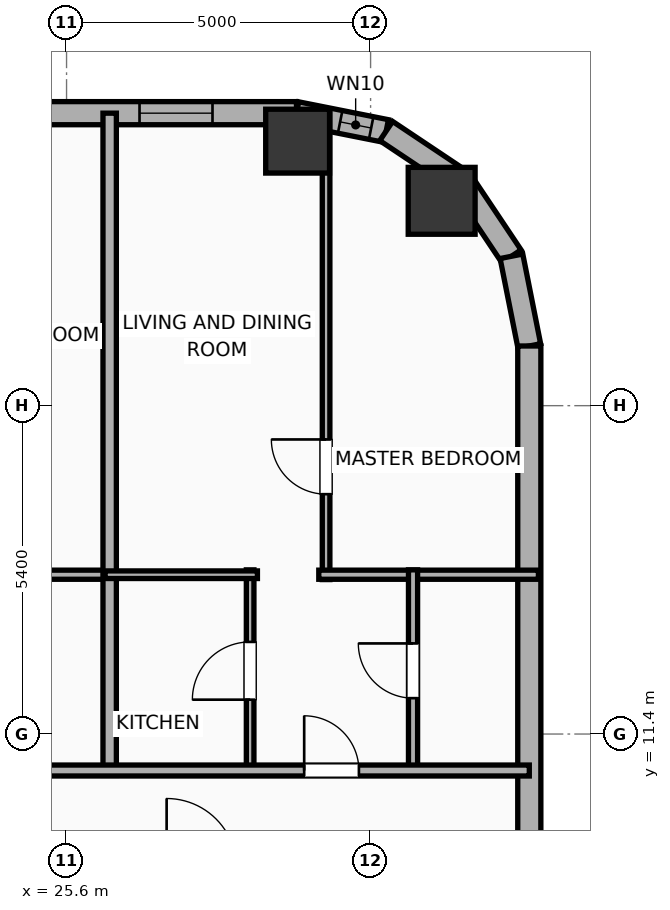
"""IFC4 building model, lengths in metres.
Left out: names, types, materials, properties, quantities, classifications, styles, units other than length and angle.
Written with IfcOpenShell. Run it as: python <this file> out.ifc"""

import sys

from ifc_helpers import new_model, si_unit, direction, frame, frame_2d, origin, origin_2d, place, context, subcontext, project, spatial, rectangle, hollow_rectangle, hollow_circle, extrude, element, fill, save


model = new_model("IFC4")
c1 = context("Model", 3, precision=1e-05, world=origin(), true_north=direction((0.0, 1.0)))
c2 = subcontext(c1, "Body", "Model", "MODEL_VIEW")
j1 = project(units=[si_unit("LENGTHUNIT", "METRE"), si_unit("PLANEANGLEUNIT", "RADIAN")], contexts=[c1])
p1 = place(None, origin())
s1 = spatial("IfcSite", under=j1, at=p1, CompositionType="ELEMENT")
p2 = place(p1, origin())
s2 = spatial("IfcBuilding", under=s1, at=p2, CompositionType="ELEMENT")
p3 = place(p2, frame((0.0, 0.0, 132.6)))
s3 = spatial("IfcBuildingStorey", under=s2, at=p3, CompositionType="ELEMENT", Elevation=132.6)
p4 = place(p3, frame((31.769, 20.169, 0.0), z_axis=(0.0, 0.0, 1.0), x_axis=(1.0, 0.0, 0.0)))
e1 = element("IfcColumn", 1, at=p4, inside=s3, PredefinedType="COLUMN", context=c2, shape_type="SweptSolid", body=[
    extrude(hollow_circle(Radius=0.55, WallThickness=0.036, at=origin_2d()), origin(), (0.0, 0.0, 1.0), 3.9),
])
p5 = place(p3, frame((29.4, 21.15, 0.0), z_axis=(0.0, 0.0, 1.0), x_axis=(1.0, 0.0, 0.0)))
e2 = element("IfcColumn", 2, at=p5, inside=s3, PredefinedType="COLUMN", context=c2, shape_type="SweptSolid", body=[
    extrude(hollow_rectangle(XDim=1.05, YDim=1.05, WallThickness=0.036, at=origin_2d()), origin(), (0.0, 0.0, 1.0), 3.9),
])
p6 = place(p3, frame((-25.381, 21.61, 0.0), z_axis=(0.0, 0.0, 1.0), x_axis=(1.0, 0.0, 0.0)))
e3 = element("IfcWall", 3, at=p6, inside=s3, PredefinedType="ELEMENTEDWALL", context=c2, shape_type="SweptSolid", body=[
    extrude(rectangle(XDim=54.763, YDim=0.38, at=frame_2d((27.381, 0.0))), origin(), (0.0, 0.0, 1.0), 3.65),
])
p7 = place(p6, frame((5.645, 0.0, 0.75)))
e4 = element("IfcOpeningElement", 4, at=p7, cuts=e3, PredefinedType="OPENING", context=c2, shape_type="SweptSolid", body=[
    extrude(rectangle(XDim=2.4, YDim=2.1, at=frame_2d((1.2, 1.05))), frame((0.0, 0.2, 0.0), z_axis=(0.0, -1.0, 0.0), x_axis=(1.0, 0.0, 0.0)), (0.0, 0.0, 1.0), 0.4),
])
p8 = place(p6, frame((45.067, 0.0, 0.75)))
e5 = element("IfcOpeningElement", 5, at=p8, cuts=e3, PredefinedType="OPENING", context=c2, shape_type="SweptSolid", body=[
    extrude(rectangle(XDim=2.4, YDim=2.1, at=frame_2d((1.2, 1.05))), frame((0.0, 0.2, 0.0), z_axis=(0.0, -1.0, 0.0), x_axis=(1.0, 0.0, 0.0)), (0.0, 0.0, 1.0), 0.4),
])
p9 = place(p6, frame((1.831, 0.0, 0.75)))
e6 = element("IfcOpeningElement", 6, at=p9, cuts=e3, PredefinedType="OPENING", context=c2, shape_type="SweptSolid", body=[
    extrude(rectangle(XDim=1.2, YDim=2.05, at=frame_2d((0.6, 1.025))), frame((0.0, 0.2, 0.0), z_axis=(0.0, -1.0, 0.0), x_axis=(1.0, 0.0, 0.0)), (0.0, 0.0, 1.0), 0.4),
])
p10 = place(p6, frame((8.996, 0.0, 0.75)))
e7 = element("IfcOpeningElement", 7, at=p10, cuts=e3, PredefinedType="OPENING", context=c2, shape_type="SweptSolid", body=[
    extrude(rectangle(XDim=1.2, YDim=2.05, at=frame_2d((0.6, 1.025))), frame((0.0, 0.2, 0.0), z_axis=(0.0, -1.0, 0.0), x_axis=(1.0, 0.0, 0.0)), (0.0, 0.0, 1.0), 0.4),
])
p11 = place(p6, frame((15.102, 0.0, 0.75)))
e8 = element("IfcOpeningElement", 8, at=p11, cuts=e3, PredefinedType="OPENING", context=c2, shape_type="SweptSolid", body=[
    extrude(rectangle(XDim=1.2, YDim=2.05, at=frame_2d((0.6, 1.025))), frame((0.0, 0.2, 0.0), z_axis=(0.0, -1.0, 0.0), x_axis=(1.0, 0.0, 0.0)), (0.0, 0.0, 1.0), 0.4),
])
p12 = place(p6, frame((12.352, 0.0, 0.75)))
e9 = element("IfcOpeningElement", 9, at=p12, cuts=e3, PredefinedType="OPENING", context=c2, shape_type="SweptSolid", body=[
    extrude(rectangle(XDim=1.2, YDim=2.05, at=frame_2d((0.6, 1.025))), frame((0.0, 0.2, 0.0), z_axis=(0.0, -1.0, 0.0), x_axis=(1.0, 0.0, 0.0)), (0.0, 0.0, 1.0), 0.4),
])
p13 = place(p6, frame((19.936, 0.0, 0.75)))
e10 = element("IfcOpeningElement", 10, at=p13, cuts=e3, PredefinedType="OPENING", context=c2, shape_type="SweptSolid", body=[
    extrude(rectangle(XDim=1.2, YDim=2.05, at=frame_2d((0.6, 1.025))), frame((0.0, 0.2, 0.0), z_axis=(0.0, -1.0, 0.0), x_axis=(1.0, 0.0, 0.0)), (0.0, 0.0, 1.0), 0.4),
])
p14 = place(p6, frame((17.786, 0.0, 0.75)))
e11 = element("IfcOpeningElement", 11, at=p14, cuts=e3, PredefinedType="OPENING", context=c2, shape_type="SweptSolid", body=[
    extrude(rectangle(XDim=1.2, YDim=2.05, at=frame_2d((0.6, 1.025))), frame((0.0, 0.2, 0.0), z_axis=(0.0, -1.0, 0.0), x_axis=(1.0, 0.0, 0.0)), (0.0, 0.0, 1.0), 0.4),
])
p15 = place(p6, frame((23.826, 0.0, 0.75)))
e12 = element("IfcOpeningElement", 12, at=p15, cuts=e3, PredefinedType="OPENING", context=c2, shape_type="SweptSolid", body=[
    extrude(rectangle(XDim=1.2, YDim=2.05, at=frame_2d((0.6, 1.025))), frame((0.0, 0.2, 0.0), z_axis=(0.0, -1.0, 0.0), x_axis=(1.0, 0.0, 0.0)), (0.0, 0.0, 1.0), 0.4),
])
p16 = place(p6, frame((26.576, 0.0, 0.75)))
e13 = element("IfcOpeningElement", 13, at=p16, cuts=e3, PredefinedType="OPENING", context=c2, shape_type="SweptSolid", body=[
    extrude(rectangle(XDim=1.2, YDim=2.05, at=frame_2d((0.6, 1.025))), frame((0.0, 0.2, 0.0), z_axis=(0.0, -1.0, 0.0), x_axis=(1.0, 0.0, 0.0)), (0.0, 0.0, 1.0), 0.4),
])
p17 = place(p6, frame((30.431, 0.0, 0.75)))
e14 = element("IfcOpeningElement", 14, at=p17, cuts=e3, PredefinedType="OPENING", context=c2, shape_type="SweptSolid", body=[
    extrude(rectangle(XDim=1.2, YDim=2.05, at=frame_2d((0.6, 1.025))), frame((0.0, 0.2, 0.0), z_axis=(0.0, -1.0, 0.0), x_axis=(1.0, 0.0, 0.0)), (0.0, 0.0, 1.0), 0.4),
])
p18 = place(p6, frame((38.581, 0.0, 0.75)))
e15 = element("IfcOpeningElement", 15, at=p18, cuts=e3, PredefinedType="OPENING", context=c2, shape_type="SweptSolid", body=[
    extrude(rectangle(XDim=1.2, YDim=2.05, at=frame_2d((0.6, 1.025))), frame((0.0, 0.2, 0.0), z_axis=(0.0, -1.0, 0.0), x_axis=(1.0, 0.0, 0.0)), (0.0, 0.0, 1.0), 0.4),
])
p19 = place(p6, frame((34.786, 0.0, 0.75)))
e16 = element("IfcOpeningElement", 16, at=p19, cuts=e3, PredefinedType="OPENING", context=c2, shape_type="SweptSolid", body=[
    extrude(rectangle(XDim=1.2, YDim=2.05, at=frame_2d((0.6, 1.025))), frame((0.0, 0.2, 0.0), z_axis=(0.0, -1.0, 0.0), x_axis=(1.0, 0.0, 0.0)), (0.0, 0.0, 1.0), 0.4),
])
p20 = place(p6, frame((41.876, 0.0, 0.75)))
e17 = element("IfcOpeningElement", 17, at=p20, cuts=e3, PredefinedType="OPENING", context=c2, shape_type="SweptSolid", body=[
    extrude(rectangle(XDim=1.2, YDim=2.05, at=frame_2d((0.6, 1.025))), frame((0.0, 0.2, 0.0), z_axis=(0.0, -1.0, 0.0), x_axis=(1.0, 0.0, 0.0)), (0.0, 0.0, 1.0), 0.4),
])
p21 = place(p6, frame((49.385, 0.0, 0.75)))
e18 = element("IfcOpeningElement", 18, at=p21, cuts=e3, PredefinedType="OPENING", context=c2, shape_type="SweptSolid", body=[
    extrude(rectangle(XDim=1.2, YDim=2.05, at=frame_2d((0.6, 1.025))), frame((0.0, 0.2, 0.0), z_axis=(0.0, -1.0, 0.0), x_axis=(1.0, 0.0, 0.0)), (0.0, 0.0, 1.0), 0.4),
])
p22 = place(p6, frame((52.181, 0.0, 0.75)))
e19 = element("IfcOpeningElement", 19, at=p22, cuts=e3, PredefinedType="OPENING", context=c2, shape_type="SweptSolid", body=[
    extrude(rectangle(XDim=1.2, YDim=2.05, at=frame_2d((0.6, 1.025))), frame((0.0, 0.2, 0.0), z_axis=(0.0, -1.0, 0.0), x_axis=(1.0, 0.0, 0.0)), (0.0, 0.0, 1.0), 0.4),
])
p23 = place(p3, frame((29.381, 21.61, 0.0), z_axis=(0.0, 0.0, 1.0), x_axis=(0.980755066645, -0.195242155415, 0.0)))
e20 = element("IfcWall", 20, at=p23, inside=s3, PredefinedType="ELEMENTEDWALL", context=c2, shape_type="SweptSolid", body=[
    extrude(rectangle(XDim=1.504, YDim=0.38, at=frame_2d((0.752, 0.0))), origin(), (0.0, 0.0, 1.0), 3.65),
])
p24 = place(p23, frame((0.732, 0.0, 0.75)))
e21 = element("IfcOpeningElement", 21, at=p24, cuts=e20, PredefinedType="OPENING", context=c2, shape_type="SweptSolid", body=[
    extrude(rectangle(XDim=0.52, YDim=2.05, at=frame_2d((0.26, 1.025))), frame((0.0, 0.2, 0.0), z_axis=(0.0, -1.0, 0.0), x_axis=(1.0, 0.0, 0.0)), (0.0, 0.0, 1.0), 0.4),
])
p25 = place(p3, frame((30.857, 21.316, 0.0), z_axis=(0.0, 0.0, 1.0), x_axis=(0.831468045563, -0.555572577804, 0.0)))
e22 = element("IfcWall", 22, at=p25, inside=s3, PredefinedType="ELEMENTEDWALL", context=c2, shape_type="SweptSolid", body=[
    extrude(rectangle(XDim=1.485, YDim=0.38, at=frame_2d((0.742, 0.0))), origin(), (0.0, 0.0, 1.0), 3.65),
])
p26 = place(p3, frame((32.091, 20.491, 0.0), z_axis=(0.0, 0.0, 1.0), x_axis=(0.555610286119, -0.831442848281, 0.0)))
e23 = element("IfcWall", 23, at=p26, inside=s3, PredefinedType="ELEMENTEDWALL", context=c2, shape_type="SweptSolid", body=[
    extrude(rectangle(XDim=1.485, YDim=0.38, at=frame_2d((0.743, 0.0))), origin(), (0.0, 0.0, 1.0), 3.65),
])
p27 = place(p3, frame((32.917, 19.257, 0.0), z_axis=(0.0, 0.0, 1.0), x_axis=(0.195086038585, -0.980786132421, 0.0)))
e24 = element("IfcWall", 24, at=p27, inside=s3, PredefinedType="ELEMENTEDWALL", context=c2, shape_type="SweptSolid", body=[
    extrude(rectangle(XDim=1.504, YDim=0.38, at=frame_2d((0.752, 0.0))), origin(), (0.0, 0.0, 1.0), 3.65),
])
p28 = place(p3, frame((33.21, 17.781, 0.0), z_axis=(0.0, 0.0, 1.0), x_axis=(0.0, -1.0, 0.0)))
e25 = element("IfcWall", 25, at=p28, inside=s3, PredefinedType="ELEMENTEDWALL", context=c2, shape_type="SweptSolid", body=[
    extrude(rectangle(XDim=34.363, YDim=0.38, at=frame_2d((17.181, 0.0))), origin(), (0.0, 0.0, 1.0), 3.65),
])
p29 = place(p28, frame((32.008, 0.0, 0.75)))
e26 = element("IfcOpeningElement", 26, at=p29, cuts=e25, PredefinedType="OPENING", context=c2, shape_type="SweptSolid", body=[
    extrude(rectangle(XDim=1.2, YDim=2.05, at=frame_2d((0.6, 1.025))), frame((0.0, 0.2, 0.0), z_axis=(0.0, -1.0, 0.0), x_axis=(1.0, 0.0, 0.0)), (0.0, 0.0, 1.0), 0.4),
])
p30 = place(p28, frame((12.486, 0.0, 0.75)))
e27 = element("IfcOpeningElement", 27, at=p30, cuts=e25, PredefinedType="OPENING", context=c2, shape_type="SweptSolid", body=[
    extrude(rectangle(XDim=1.2, YDim=2.05, at=frame_2d((0.6, 1.025))), frame((0.0, 0.2, 0.0), z_axis=(0.0, -1.0, 0.0), x_axis=(1.0, 0.0, 0.0)), (0.0, 0.0, 1.0), 0.4),
])
p31 = place(p28, frame((21.736, 0.0, 0.75)))
e28 = element("IfcOpeningElement", 28, at=p31, cuts=e25, PredefinedType="OPENING", context=c2, shape_type="SweptSolid", body=[
    extrude(rectangle(XDim=1.2, YDim=2.05, at=frame_2d((0.6, 1.025))), frame((0.0, 0.2, 0.0), z_axis=(0.0, -1.0, 0.0), x_axis=(1.0, 0.0, 0.0)), (0.0, 0.0, 1.0), 0.4),
])
p32 = place(p3, frame((22.779, 14.02, 0.0), z_axis=(0.0, 0.0, 1.0), x_axis=(1.0, 0.0, 0.0)))
e29 = element("IfcWall", 29, at=p32, inside=s3, PredefinedType="PLUMBINGWALL", context=c2, shape_type="SweptSolid", body=[
    extrude(rectangle(XDim=3.605, YDim=0.15, at=frame_2d((1.802, 0.0))), origin(), (0.0, 0.0, 1.0), 3.65),
])
p33 = place(p3, frame((26.309, 10.72, 0.0), z_axis=(0.0, 0.0, 1.0), x_axis=(0.0, 1.0, 0.0)))
e30 = element("IfcWall", 30, at=p33, inside=s3, PredefinedType="PARTITIONING", context=c2, shape_type="SweptSolid", body=[
    extrude(rectangle(XDim=10.89, YDim=0.22, at=frame_2d((5.445, 0.0))), origin(), (0.0, 0.0, 1.0), 3.65),
])
p34 = place(p3, frame((29.868, 13.94, 0.0), z_axis=(0.0, 0.0, 1.0), x_axis=(0.0, 1.0, 0.0)))
e31 = element("IfcWall", 31, at=p34, inside=s3, PredefinedType="PARTITIONING", context=c2, shape_type="SweptSolid", body=[
    extrude(rectangle(XDim=7.726, YDim=0.125, at=frame_2d((3.863, 0.0))), origin(), (0.0, 0.0, 1.0), 3.65),
])
p35 = place(p34, frame((1.404, 0.0, 0.0)))
e32 = element("IfcOpeningElement", 32, at=p35, cuts=e31, PredefinedType="OPENING", context=c2, shape_type="SweptSolid", body=[
    extrude(rectangle(XDim=0.9, YDim=2.05, at=frame_2d((0.45, 1.025))), frame((0.0, 0.073, 0.0), z_axis=(0.0, -1.0, 0.0), x_axis=(1.0, 0.0, 0.0)), (0.0, 0.0, 1.0), 0.145),
])
p36 = place(p3, frame((29.748, 14.02, 0.0), z_axis=(0.0, 0.0, 1.0), x_axis=(1.0, 0.0, 0.0)))
e33 = element("IfcWall", 33, at=p36, inside=s3, PredefinedType="PLUMBINGWALL", context=c2, shape_type="SweptSolid", body=[
    extrude(rectangle(XDim=3.612, YDim=0.15, at=frame_2d((1.806, 0.0))), origin(), (0.0, 0.0, 1.0), 3.65),
])
p37 = place(p3, frame((28.619, 10.78, 0.0), z_axis=(0.0, 0.0, 1.0), x_axis=(0.0, 1.0, 0.0)))
e34 = element("IfcWall", 34, at=p37, inside=s3, PredefinedType="PARTITIONING", context=c2, shape_type="SweptSolid", body=[
    extrude(rectangle(XDim=3.32, YDim=0.125, at=frame_2d((1.66, 0.0))), origin(), (0.0, 0.0, 1.0), 3.65),
])
p38 = place(p37, frame((1.185, 0.0, 0.0)))
e35 = element("IfcOpeningElement", 35, at=p38, cuts=e34, PredefinedType="OPENING", context=c2, shape_type="SweptSolid", body=[
    extrude(rectangle(XDim=0.95, YDim=2.05, at=frame_2d((0.475, 1.025))), frame((0.0, 0.073, 0.0), z_axis=(0.0, -1.0, 0.0), x_axis=(1.0, 0.0, 0.0)), (0.0, 0.0, 1.0), 0.145),
])
p39 = place(p3, frame((26.234, 14.02, 0.0), z_axis=(0.0, 0.0, 1.0), x_axis=(1.0, 0.0, 0.0)))
e36 = element("IfcWall", 36, at=p39, inside=s3, PredefinedType="PARTITIONING", context=c2, shape_type="SweptSolid", body=[
    extrude(rectangle(XDim=2.505, YDim=0.125, at=frame_2d((1.252, 0.0))), origin(), (0.0, 0.0, 1.0), 3.65),
])
p40 = place(p3, frame((31.298, 10.78, 0.0), z_axis=(0.0, 0.0, 1.0), x_axis=(0.0, 1.0, 0.0)))
e37 = element("IfcWall", 37, at=p40, inside=s3, PredefinedType="PLUMBINGWALL", context=c2, shape_type="SweptSolid", body=[
    extrude(rectangle(XDim=3.32, YDim=0.15, at=frame_2d((1.66, 0.0))), origin(), (0.0, 0.0, 1.0), 3.65),
])
p41 = place(p40, frame((1.21, 0.0, 0.0)))
e38 = element("IfcOpeningElement", 38, at=p41, cuts=e37, PredefinedType="OPENING", context=c2, shape_type="SweptSolid", body=[
    extrude(rectangle(XDim=0.9, YDim=2.05, at=frame_2d((0.45, 1.025))), frame((0.0, 0.085, 0.0), z_axis=(0.0, -1.0, 0.0), x_axis=(1.0, 0.0, 0.0)), (0.0, 0.0, 1.0), 0.17),
])
p42 = place(p3, frame((-29.21, 10.8, 0.0), z_axis=(0.0, 0.0, 1.0), x_axis=(1.0, 0.0, 0.0)))
e39 = element("IfcWall", 39, at=p42, inside=s3, PredefinedType="PARTITIONING", context=c2, shape_type="SweptSolid", body=[
    extrude(rectangle(XDim=62.42, YDim=0.18, at=frame_2d((31.21, 0.0))), origin(), (0.0, 0.0, 1.0), 3.65),
])
p43 = place(p42, frame((3.457, 0.0, 0.0)))
e40 = element("IfcOpeningElement", 40, at=p43, cuts=e39, PredefinedType="OPENING", context=c2, shape_type="SweptSolid", body=[
    extrude(rectangle(XDim=1.15, YDim=2.05, at=frame_2d((0.575, 1.025))), frame((0.0, 0.1, 0.0), z_axis=(0.0, -1.0, 0.0), x_axis=(1.0, 0.0, 0.0)), (0.0, 0.0, 1.0), 0.2),
])
p44 = place(p42, frame((11.297, 0.0, 0.0)))
e41 = element("IfcOpeningElement", 41, at=p44, cuts=e39, PredefinedType="OPENING", context=c2, shape_type="SweptSolid", body=[
    extrude(rectangle(XDim=1.15, YDim=2.05, at=frame_2d((0.575, 1.025))), frame((0.0, 0.1, 0.0), z_axis=(0.0, -1.0, 0.0), x_axis=(1.0, 0.0, 0.0)), (0.0, 0.0, 1.0), 0.2),
])
p45 = place(p42, frame((18.925, 0.0, 0.0)))
e42 = element("IfcOpeningElement", 42, at=p45, cuts=e39, PredefinedType="OPENING", context=c2, shape_type="SweptSolid", body=[
    extrude(rectangle(XDim=1.15, YDim=2.05, at=frame_2d((0.575, 1.025))), frame((0.0, 0.1, 0.0), z_axis=(0.0, -1.0, 0.0), x_axis=(1.0, 0.0, 0.0)), (0.0, 0.0, 1.0), 0.2),
])
p46 = place(p42, frame((24.362, 0.0, 0.0)))
e43 = element("IfcOpeningElement", 43, at=p46, cuts=e39, PredefinedType="OPENING", context=c2, shape_type="SweptSolid", body=[
    extrude(rectangle(XDim=1.15, YDim=2.05, at=frame_2d((0.575, 1.025))), frame((0.0, 0.1, 0.0), z_axis=(0.0, -1.0, 0.0), x_axis=(1.0, 0.0, 0.0)), (0.0, 0.0, 1.0), 0.2),
])
p47 = place(p42, frame((27.708, 0.0, 0.0)))
e44 = element("IfcOpeningElement", 44, at=p47, cuts=e39, PredefinedType="OPENING", context=c2, shape_type="SweptSolid", body=[
    extrude(rectangle(XDim=1.15, YDim=2.05, at=frame_2d((0.575, 1.025))), frame((0.0, 0.1, 0.0), z_axis=(0.0, -1.0, 0.0), x_axis=(1.0, 0.0, 0.0)), (0.0, 0.0, 1.0), 0.2),
])
p48 = place(p42, frame((34.618, 0.0, 0.0)))
e45 = element("IfcOpeningElement", 45, at=p48, cuts=e39, PredefinedType="OPENING", context=c2, shape_type="SweptSolid", body=[
    extrude(rectangle(XDim=0.9, YDim=2.05, at=frame_2d((0.45, 1.025))), frame((0.0, 0.1, 0.0), z_axis=(0.0, -1.0, 0.0), x_axis=(1.0, 0.0, 0.0)), (0.0, 0.0, 1.0), 0.2),
])
p49 = place(p42, frame((43.106, 0.0, 0.0)))
e46 = element("IfcOpeningElement", 46, at=p49, cuts=e39, PredefinedType="OPENING", context=c2, shape_type="SweptSolid", body=[
    extrude(rectangle(XDim=1.15, YDim=2.05, at=frame_2d((0.575, 1.025))), frame((0.0, 0.1, 0.0), z_axis=(0.0, -1.0, 0.0), x_axis=(1.0, 0.0, 0.0)), (0.0, 0.0, 1.0), 0.2),
])
p50 = place(p42, frame((51.777, 0.0, 0.0)))
e47 = element("IfcOpeningElement", 47, at=p50, cuts=e39, PredefinedType="OPENING", context=c2, shape_type="SweptSolid", body=[
    extrude(rectangle(XDim=0.9, YDim=2.05, at=frame_2d((0.45, 1.025))), frame((0.0, 0.1, 0.0), z_axis=(0.0, -1.0, 0.0), x_axis=(1.0, 0.0, 0.0)), (0.0, 0.0, 1.0), 0.2),
])
p51 = place(p42, frame((58.718, 0.0, 0.0)))
e48 = element("IfcOpeningElement", 48, at=p51, cuts=e39, PredefinedType="OPENING", context=c2, shape_type="SweptSolid", body=[
    extrude(rectangle(XDim=0.9, YDim=2.05, at=frame_2d((0.45, 1.025))), frame((0.0, 0.1, 0.0), z_axis=(0.0, -1.0, 0.0), x_axis=(1.0, 0.0, 0.0)), (0.0, 0.0, 1.0), 0.2),
])
p52 = place(p22, origin())
e49 = element("IfcWindow", 49, at=p52, inside=s3, PartitioningType="SINGLE_PANEL", PredefinedType="WINDOW", context=c2, shape_type="SweptSolid", body=[
    extrude(rectangle(XDim=1.2, YDim=2.05, at=frame_2d((0.6, 1.025))), frame((0.0, 0.03, 0.0), z_axis=(0.0, -1.0, 0.0), x_axis=(1.0, 0.0, 0.0)), (0.0, 0.0, 1.0), 0.06),
])
fill(e19, e49)
p53 = place(p24, origin())
e50 = element("IfcWindow", 50, at=p53, inside=s3, PartitioningType="SINGLE_PANEL", PredefinedType="WINDOW", context=c2, shape_type="SweptSolid", body=[
    extrude(rectangle(XDim=0.52, YDim=2.05, at=frame_2d((0.26, 1.025))), frame((0.0, 0.03, 0.0), z_axis=(0.0, -1.0, 0.0), x_axis=(1.0, 0.0, 0.0)), (0.0, 0.0, 1.0), 0.06),
])
fill(e21, e50)
p54 = place(p35, origin())
e51 = element("IfcDoor", 51, at=p54, inside=s3, OperationType="SINGLE_SWING_RIGHT", PredefinedType="DOOR", context=c2, shape_type="SweptSolid", body=[
    extrude(rectangle(XDim=0.9, YDim=2.05, at=frame_2d((0.45, 1.025))), frame((0.0, 0.025, 0.0), z_axis=(0.0, -1.0, 0.0), x_axis=(1.0, 0.0, 0.0)), (0.0, 0.0, 1.0), 0.05),
])
fill(e32, e51)
p55 = place(p38, origin())
e52 = element("IfcDoor", 52, at=p55, inside=s3, OperationType="SINGLE_SWING_LEFT", PredefinedType="DOOR", context=c2, shape_type="SweptSolid", body=[
    extrude(rectangle(XDim=0.95, YDim=2.05, at=frame_2d((0.475, 1.025))), frame((0.0, 0.025, 0.0), z_axis=(0.0, -1.0, 0.0), x_axis=(1.0, 0.0, 0.0)), (0.0, 0.0, 1.0), 0.05),
])
fill(e35, e52)
p56 = place(p41, origin())
e53 = element("IfcDoor", 53, at=p56, inside=s3, OperationType="SINGLE_SWING_RIGHT", PredefinedType="DOOR", context=c2, shape_type="SweptSolid", body=[
    extrude(rectangle(XDim=0.9, YDim=2.05, at=frame_2d((0.45, 1.025))), frame((0.0, 0.025, 0.0), z_axis=(0.0, -1.0, 0.0), x_axis=(1.0, 0.0, 0.0)), (0.0, 0.0, 1.0), 0.05),
])
fill(e38, e53)
p57 = place(p51, origin())
e54 = element("IfcDoor", 54, at=p57, inside=s3, OperationType="SINGLE_SWING_LEFT", PredefinedType="DOOR", context=c2, shape_type="SweptSolid", body=[
    extrude(rectangle(XDim=0.9, YDim=2.05, at=frame_2d((0.45, 1.025))), frame((0.0, 0.025, 0.0), z_axis=(0.0, -1.0, 0.0), x_axis=(1.0, 0.0, 0.0)), (0.0, 0.0, 1.0), 0.05),
])
fill(e48, e54)
save(model, sys.argv[1])
